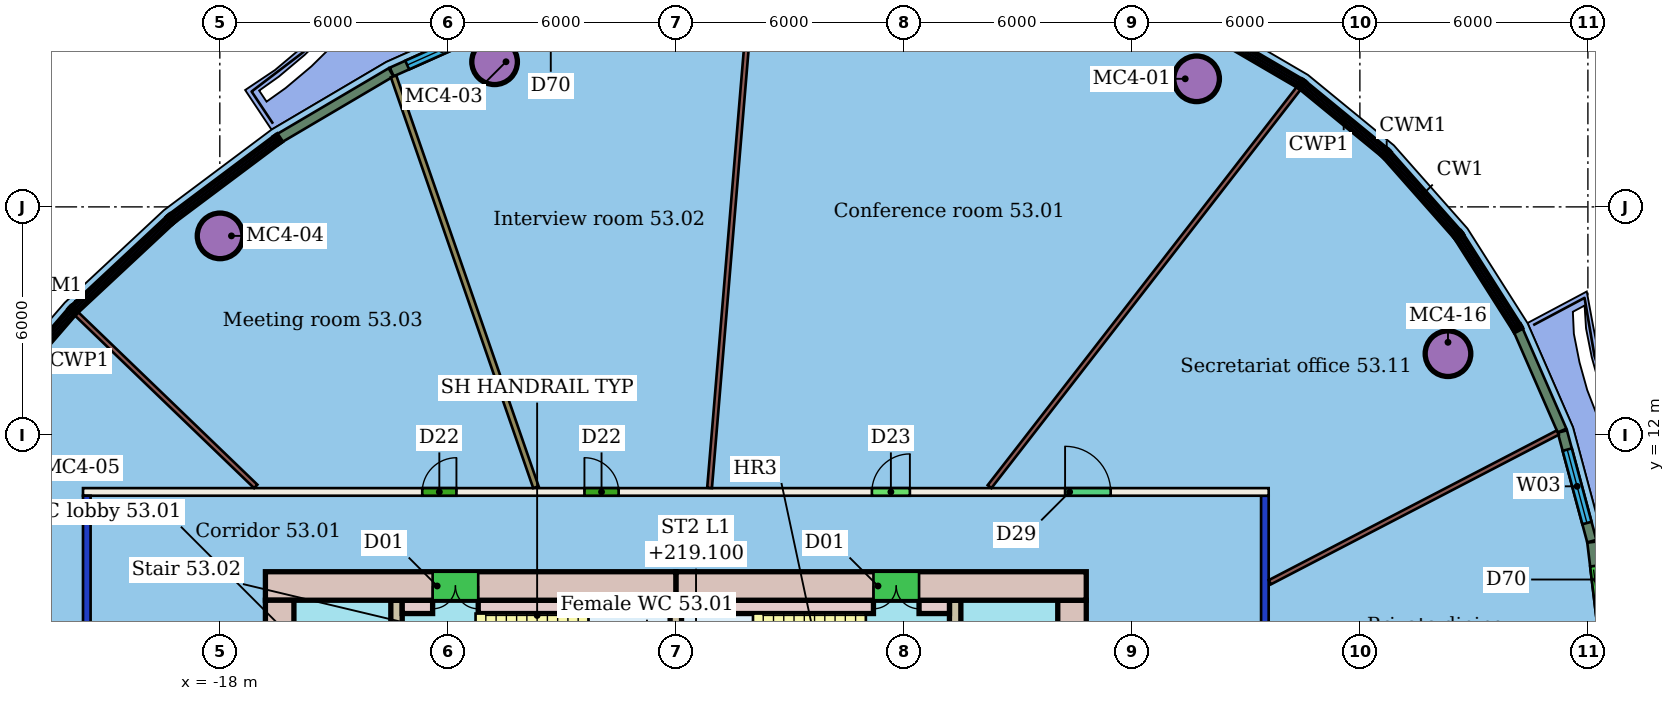
"""IFC4 building model, lengths in metres.
Left out: names, types, materials, properties, quantities, classifications, styles, units other than length and angle.
Written with IfcOpenShell. Run it as: python <this file> out.ifc"""

import sys

from ifc_helpers import new_model, si_unit, direction, frame, frame_2d, origin, origin_2d, place, context, subcontext, project, spatial, rectangle, hollow_circle, extrude, element, fill, save


model = new_model("IFC4")
c1 = context("Model", 3, precision=1e-05, world=origin(), true_north=direction((0.0, 1.0)))
c2 = subcontext(c1, "Body", "Model", "MODEL_VIEW")
j1 = project(units=[si_unit("LENGTHUNIT", "METRE"), si_unit("PLANEANGLEUNIT", "RADIAN")], contexts=[c1])
p1 = place(None, origin())
s1 = spatial("IfcSite", under=j1, at=p1, CompositionType="ELEMENT")
p2 = place(p1, origin())
s2 = spatial("IfcBuilding", under=s1, at=p2, CompositionType="ELEMENT")
p3 = place(p2, frame((0.0, 0.0, 217.3)))
s3 = spatial("IfcBuildingStorey", under=s2, at=p3, CompositionType="ELEMENT", Elevation=217.3)
for number, where, z_axis, x_axis in (
    (1, (7.704, 21.37, 0.0), (0.0, 0.0, 1.0), (1.0, 0.0, 0.0)),
    (2, (-10.769, 21.819, 0.0), (0.0, 0.0, 1.0), (1.0, 0.0, 0.0)),
    (3, (-17.993, 17.237, 0.0), (0.0, 0.0, 1.0), (1.0, 0.0, 0.0)),
    (4, (14.318, 14.137, 0.0), (0.0, 0.0, 1.0), (1.0, 0.0, 0.0)),
):
    element("IfcColumn", number, at=place(p3, frame(where, z_axis=z_axis, x_axis=x_axis)), inside=s3, PredefinedType="COLUMN", context=c2, shape_type="SweptSolid", body=[
        extrude(hollow_circle(Radius=0.6, WallThickness=0.045, at=origin_2d()), origin(), (0.0, 0.0, 1.0), 3.45),
    ])
p4 = place(p3, frame((-21.5, -10.4, 0.0), z_axis=(0.0, 0.0, 1.0), x_axis=(0.0, 1.0, 0.0)))
e5 = element("IfcWall", 5, at=p4, inside=s3, PredefinedType="PARTITIONING", context=c2, shape_type="SweptSolid", body=[
    extrude(rectangle(XDim=20.8, YDim=0.2, at=frame_2d((10.4, 0.0))), origin(), (0.0, 0.0, 1.0), 3.05),
])
p5 = place(p4, frame((13.596, 0.0, 0.0)))
e6 = element("IfcOpeningElement", 6, at=p5, cuts=e5, PredefinedType="OPENING", context=c2, shape_type="SweptSolid", body=[
    extrude(rectangle(XDim=1.0, YDim=2.4, at=frame_2d((0.5, 1.2))), frame((0.0, 0.11, 0.0), z_axis=(0.0, -1.0, 0.0), x_axis=(1.0, 0.0, 0.0)), (0.0, 0.0, 1.0), 0.22),
])
p6 = place(p4, frame((5.876, 0.0, 0.0)))
e7 = element("IfcOpeningElement", 7, at=p6, cuts=e5, PredefinedType="OPENING", context=c2, shape_type="SweptSolid", body=[
    extrude(rectangle(XDim=1.8, YDim=2.4, at=frame_2d((0.9, 1.2))), frame((0.0, 0.11, 0.0), z_axis=(0.0, -1.0, 0.0), x_axis=(1.0, 0.0, 0.0)), (0.0, 0.0, 1.0), 0.22),
])
p7 = place(p3, frame((-21.6, 10.5, 0.0), z_axis=(0.0, 0.0, 1.0), x_axis=(1.0, 0.0, 0.0)))
e8 = element("IfcWall", 8, at=p7, inside=s3, PredefinedType="PARTITIONING", context=c2, shape_type="SweptSolid", body=[
    extrude(rectangle(XDim=31.2, YDim=0.2, at=frame_2d((15.6, 0.0))), origin(), (0.0, 0.0, 1.0), 3.45),
])
p8 = place(p7, frame((20.759, 0.0, 0.0)))
e9 = element("IfcOpeningElement", 9, at=p8, cuts=e8, PredefinedType="OPENING", context=c2, shape_type="SweptSolid", body=[
    extrude(rectangle(XDim=1.0, YDim=2.4, at=frame_2d((0.5, 1.2))), frame((0.0, 0.11, 0.0), z_axis=(0.0, -1.0, 0.0), x_axis=(1.0, 0.0, 0.0)), (0.0, 0.0, 1.0), 0.22),
])
p9 = place(p7, frame((13.195, 0.0, 0.0)))
e10 = element("IfcOpeningElement", 10, at=p9, cuts=e8, PredefinedType="OPENING", context=c2, shape_type="SweptSolid", body=[
    extrude(rectangle(XDim=0.9, YDim=2.1, at=frame_2d((0.45, 1.05))), frame((0.0, 0.11, 0.0), z_axis=(0.0, -1.0, 0.0), x_axis=(1.0, 0.0, 0.0)), (0.0, 0.0, 1.0), 0.22),
])
p10 = place(p7, frame((8.927, 0.0, 0.0)))
e11 = element("IfcOpeningElement", 11, at=p10, cuts=e8, PredefinedType="OPENING", context=c2, shape_type="SweptSolid", body=[
    extrude(rectangle(XDim=0.9, YDim=2.1, at=frame_2d((0.45, 1.05))), frame((0.0, 0.11, 0.0), z_axis=(0.0, -1.0, 0.0), x_axis=(1.0, 0.0, 0.0)), (0.0, 0.0, 1.0), 0.22),
])
p11 = place(p7, frame((25.843, 0.0, 0.0)))
e12 = element("IfcOpeningElement", 12, at=p11, cuts=e8, PredefinedType="OPENING", context=c2, shape_type="SweptSolid", body=[
    extrude(rectangle(XDim=1.2, YDim=2.4, at=frame_2d((0.6, 1.2))), frame((0.0, 0.11, 0.0), z_axis=(0.0, -1.0, 0.0), x_axis=(1.0, 0.0, 0.0)), (0.0, 0.0, 1.0), 0.22),
])
p12 = place(p3, frame((9.5, 10.4, 0.0), z_axis=(0.0, 0.0, 1.0), x_axis=(0.0, -1.0, 0.0)))
e13 = element("IfcWall", 13, at=p12, inside=s3, PredefinedType="PARTITIONING", context=c2, shape_type="SweptSolid", body=[
    extrude(rectangle(XDim=20.8, YDim=0.2, at=frame_2d((10.4, 0.0))), origin(), (0.0, 0.0, 1.0), 3.05),
])
p13 = place(p12, frame((14.911, 0.0, 0.0)))
e14 = element("IfcOpeningElement", 14, at=p13, cuts=e13, PredefinedType="OPENING", context=c2, shape_type="SweptSolid", body=[
    extrude(rectangle(XDim=0.9, YDim=2.1, at=frame_2d((0.45, 1.05))), frame((0.0, 0.11, 0.0), z_axis=(0.0, -1.0, 0.0), x_axis=(1.0, 0.0, 0.0)), (0.0, 0.0, 1.0), 0.22),
])
p14 = place(p12, frame((4.489, 0.0, 0.0)))
e15 = element("IfcOpeningElement", 15, at=p14, cuts=e13, PredefinedType="OPENING", context=c2, shape_type="SweptSolid", body=[
    extrude(rectangle(XDim=1.5, YDim=2.1, at=frame_2d((0.75, 1.05))), frame((0.0, 0.11, 0.0), z_axis=(0.0, -1.0, 0.0), x_axis=(1.0, 0.0, 0.0)), (0.0, 0.0, 1.0), 0.22),
])
p15 = place(p3, frame((10.391, 21.124, 0.0), z_axis=(0.0, 0.0, 1.0), x_axis=(-0.613043629226, -0.790049054594, 0.0)))
e16 = element("IfcWall", 16, at=p15, inside=s3, PredefinedType="PARTITIONING", context=c2, shape_type="SweptSolid", body=[
    extrude(rectangle(XDim=13.271, YDim=0.125, at=frame_2d((6.636, 0.0))), origin(), (0.0, 0.0, 1.0), 3.45),
])
p16 = place(p3, frame((-3.958, 24.399, 0.0), z_axis=(0.0, 0.0, 1.0), x_axis=(-0.083375368872, -0.996518212511, 0.0)))
e17 = element("IfcWall", 17, at=p16, inside=s3, PredefinedType="PARTITIONING", context=c2, shape_type="SweptSolid", body=[
    extrude(rectangle(XDim=13.842, YDim=0.125, at=frame_2d((6.921, 0.0))), origin(), (0.0, 0.0, 1.0), 3.45),
])
p17 = place(p3, frame((-13.428, 21.434, 0.0), z_axis=(0.0, 0.0, 1.0), x_axis=(0.327447705094, -0.944869303358, 0.0)))
e18 = element("IfcWall", 18, at=p17, inside=s3, PredefinedType="PARTITIONING", context=c2, shape_type="SweptSolid", body=[
    extrude(rectangle(XDim=11.44, YDim=0.15, at=frame_2d((5.72, 0.0))), origin(), (0.0, 0.0, 1.0), 3.45),
])
p18 = place(p3, frame((-21.771, 15.187, 0.0), z_axis=(0.0, 0.0, 1.0), x_axis=(0.72030986436, -0.69365243408, 0.0)))
e19 = element("IfcWall", 19, at=p18, inside=s3, PredefinedType="PARTITIONING", context=c2, shape_type="SweptSolid", body=[
    extrude(rectangle(XDim=6.548, YDim=0.125, at=frame_2d((3.274, 0.0))), origin(), (0.0, 0.0, 1.0), 3.45),
])
p19 = place(p3, frame((17.207, 12.061, 0.0), z_axis=(0.0, 0.0, 1.0), x_axis=(-0.887319286248, -0.461155596574, 0.0)))
e20 = element("IfcWall", 20, at=p19, inside=s3, PredefinedType="PARTITIONING", context=c2, shape_type="SweptSolid", body=[
    extrude(rectangle(XDim=8.54, YDim=0.125, at=frame_2d((4.27, 0.0))), origin(), (0.0, 0.0, 1.0), 3.45),
])
p20 = place(p3, frame((-10.38, 22.933, 0.0), z_axis=(0.0, 0.0, 1.0), x_axis=(-0.913013847156, -0.40792856593, 0.0)))
e21 = element("IfcWall", 21, at=p20, inside=s3, PredefinedType="SOLIDWALL", context=c2, shape_type="SweptSolid", body=[
    extrude(rectangle(XDim=3.39, YDim=0.25, at=frame_2d((1.695, 0.0))), origin(), (0.0, 0.0, 1.0), 3.1),
])
p21 = place(p20, frame((0.945, 0.0, 0.9)))
e22 = element("IfcOpeningElement", 22, at=p21, cuts=e21, PredefinedType="OPENING", context=c2, shape_type="SweptSolid", body=[
    extrude(rectangle(XDim=2.0, YDim=2.1, at=frame_2d((1.0, 1.05))), frame((0.0, 0.135, 0.0), z_axis=(0.0, -1.0, 0.0), x_axis=(1.0, 0.0, 0.0)), (0.0, 0.0, 1.0), 0.27),
])
p22 = place(p3, frame((-13.495, 21.54, 0.0), z_axis=(0.0, 0.0, 1.0), x_axis=(-0.861311961965, -0.508076474731, 0.0)))
e23 = element("IfcWall", 23, at=p22, inside=s3, PredefinedType="SOLIDWALL", context=c2, shape_type="SweptSolid", body=[
    extrude(rectangle(XDim=3.403, YDim=0.25, at=frame_2d((1.701, 0.0))), origin(), (0.0, 0.0, 1.0), 3.1),
])
p23 = place(p3, frame((18.475, 6.137, 0.0), z_axis=(0.0, 0.0, 1.0), x_axis=(-0.119946033094, 0.992780413357, 0.0)))
e24 = element("IfcWall", 24, at=p23, inside=s3, PredefinedType="SOLIDWALL", context=c2, shape_type="SweptSolid", body=[
    extrude(rectangle(XDim=3.065, YDim=0.25, at=frame_2d((1.533, 0.0))), origin(), (0.0, 0.0, 1.0), 3.1),
])
p24 = place(p23, frame((0.633, 0.0, 0.0)))
e25 = element("IfcOpeningElement", 25, at=p24, cuts=e24, PredefinedType="OPENING", context=c2, shape_type="SweptSolid", body=[
    extrude(rectangle(XDim=1.8, YDim=2.4, at=frame_2d((0.9, 1.2))), frame((0.0, 0.135, 0.0), z_axis=(0.0, -1.0, 0.0), x_axis=(1.0, 0.0, 0.0)), (0.0, 0.0, 1.0), 0.27),
])
p25 = place(p3, frame((18.103, 9.206, 0.0), z_axis=(0.0, 0.0, 1.0), x_axis=(-0.25942805707, 0.965762436215, 0.0)))
e26 = element("IfcWall", 26, at=p25, inside=s3, PredefinedType="SOLIDWALL", context=c2, shape_type="SweptSolid", body=[
    extrude(rectangle(XDim=2.986, YDim=0.25, at=frame_2d((1.493, 0.0))), origin(), (0.0, 0.0, 1.0), 3.1),
])
p26 = place(p25, frame((0.493, 0.0, 0.9)))
e27 = element("IfcOpeningElement", 27, at=p26, cuts=e26, PredefinedType="OPENING", context=c2, shape_type="SweptSolid", body=[
    extrude(rectangle(XDim=2.0, YDim=2.1, at=frame_2d((1.0, 1.05))), frame((0.0, 0.135, 0.0), z_axis=(0.0, -1.0, 0.0), x_axis=(1.0, 0.0, 0.0)), (0.0, 0.0, 1.0), 0.27),
])
p27 = place(p3, frame((17.319, 12.115, 0.0), z_axis=(0.0, 0.0, 1.0), x_axis=(-0.40003123877, 0.91650150464, 0.0)))
e28 = element("IfcWall", 28, at=p27, inside=s3, PredefinedType="SOLIDWALL", context=c2, shape_type="SweptSolid", body=[
    extrude(rectangle(XDim=2.879, YDim=0.25, at=frame_2d((1.439, 0.0))), origin(), (0.0, 0.0, 1.0), 3.1),
])
p28 = place(p3, frame((4.8, 8.025, 0.0), z_axis=(0.0, 0.0, 1.0), x_axis=(-1.0, 0.0, 0.0)))
e29 = element("IfcWall", 29, at=p28, inside=s3, PredefinedType="SHEAR", context=c2, shape_type="SweptSolid", body=[
    extrude(rectangle(XDim=10.8, YDim=0.75, at=frame_2d((5.4, 0.0))), origin(), (0.0, 0.0, 1.0), 3.3),
])
p29 = place(p28, frame((4.4, 0.0, 0.0)))
e30 = element("IfcOpeningElement", 30, at=p29, cuts=e29, PredefinedType="OPENING", context=c2, shape_type="SweptSolid", body=[
    extrude(rectangle(XDim=1.2, YDim=2.1, at=frame_2d((0.6, 1.05))), frame((0.0, 0.385, 0.0), z_axis=(0.0, -1.0, 0.0), x_axis=(1.0, 0.0, 0.0)), (0.0, 0.0, 1.0), 0.77),
])
p30 = place(p3, frame((-6.0, 8.025, 0.0), z_axis=(0.0, 0.0, 1.0), x_axis=(-1.0, 0.0, 0.0)))
e31 = element("IfcWall", 31, at=p30, inside=s3, PredefinedType="SHEAR", context=c2, shape_type="SweptSolid", body=[
    extrude(rectangle(XDim=10.8, YDim=0.75, at=frame_2d((5.4, 0.0))), origin(), (0.0, 0.0, 1.0), 3.3),
])
p31 = place(p30, frame((5.2, 0.0, 0.0)))
e32 = element("IfcOpeningElement", 32, at=p31, cuts=e31, PredefinedType="OPENING", context=c2, shape_type="SweptSolid", body=[
    extrude(rectangle(XDim=1.2, YDim=2.1, at=frame_2d((0.6, 1.05))), frame((0.0, 0.385, 0.0), z_axis=(0.0, -1.0, 0.0), x_axis=(1.0, 0.0, 0.0)), (0.0, 0.0, 1.0), 0.77),
])
p32 = place(p3, frame((-16.425, 7.65, 0.0), z_axis=(0.0, 0.0, 1.0), x_axis=(0.0, -1.0, 0.0)))
e33 = element("IfcWall", 33, at=p32, inside=s3, PredefinedType="SHEAR", context=c2, shape_type="SweptSolid", body=[
    extrude(rectangle(XDim=15.3, YDim=0.75, at=frame_2d((7.65, 0.0))), origin(), (0.0, 0.0, 1.0), 3.3),
])
p33 = place(p32, frame((11.25, 0.0, 0.0)))
e34 = element("IfcOpeningElement", 34, at=p33, cuts=e33, PredefinedType="OPENING", context=c2, shape_type="SweptSolid", body=[
    extrude(rectangle(XDim=1.2, YDim=2.1, at=frame_2d((0.6, 1.05))), frame((0.0, 0.385, 0.0), z_axis=(0.0, -1.0, 0.0), x_axis=(1.0, 0.0, 0.0)), (0.0, 0.0, 1.0), 0.77),
])
p34 = place(p32, frame((2.85, 0.0, 0.0)))
e35 = element("IfcOpeningElement", 35, at=p34, cuts=e33, PredefinedType="OPENING", context=c2, shape_type="SweptSolid", body=[
    extrude(rectangle(XDim=1.2, YDim=2.1, at=frame_2d((0.6, 1.05))), frame((0.0, 0.385, 0.0), z_axis=(0.0, -1.0, 0.0), x_axis=(1.0, 0.0, 0.0)), (0.0, 0.0, 1.0), 0.77),
])
p35 = place(p3, frame((4.425, -7.65, 0.0), z_axis=(0.0, 0.0, 1.0), x_axis=(0.0, 1.0, 0.0)))
e36 = element("IfcWall", 36, at=p35, inside=s3, PredefinedType="SHEAR", context=c2, shape_type="SweptSolid", body=[
    extrude(rectangle(XDim=15.3, YDim=0.75, at=frame_2d((7.65, 0.0))), origin(), (0.0, 0.0, 1.0), 3.3),
])
p36 = place(p35, frame((2.85, 0.0, 0.0)))
e37 = element("IfcOpeningElement", 37, at=p36, cuts=e36, PredefinedType="OPENING", context=c2, shape_type="SweptSolid", body=[
    extrude(rectangle(XDim=1.2, YDim=2.1, at=frame_2d((0.6, 1.05))), frame((0.0, 0.385, 0.0), z_axis=(0.0, -1.0, 0.0), x_axis=(1.0, 0.0, 0.0)), (0.0, 0.0, 1.0), 0.77),
])
p37 = place(p35, frame((11.25, 0.0, 0.0)))
e38 = element("IfcOpeningElement", 38, at=p37, cuts=e36, PredefinedType="OPENING", context=c2, shape_type="SweptSolid", body=[
    extrude(rectangle(XDim=1.2, YDim=2.1, at=frame_2d((0.6, 1.05))), frame((0.0, 0.385, 0.0), z_axis=(0.0, -1.0, 0.0), x_axis=(1.0, 0.0, 0.0)), (0.0, 0.0, 1.0), 0.77),
])
p38 = place(p3, frame((-13.35, 7.65, 0.0), z_axis=(0.0, 0.0, 1.0), x_axis=(0.0, -1.0, 0.0)))
e39 = element("IfcWall", 39, at=p38, inside=s3, PredefinedType="SHEAR", context=c2, shape_type="SweptSolid", body=[
    extrude(rectangle(XDim=15.3, YDim=0.3, at=frame_2d((7.65, 0.0))), origin(), (0.0, 0.0, 1.0), 3.3),
])
p39 = place(p38, frame((6.9, 0.0, 0.0)))
e40 = element("IfcOpeningElement", 40, at=p39, cuts=e39, PredefinedType="OPENING", context=c2, shape_type="SweptSolid", body=[
    extrude(rectangle(XDim=1.5, YDim=2.1, at=frame_2d((0.75, 1.05))), frame((0.0, 0.16, 0.0), z_axis=(0.0, -1.0, 0.0), x_axis=(1.0, 0.0, 0.0)), (0.0, 0.0, 1.0), 0.32),
])
p40 = place(p3, frame((1.35, -7.65, 0.0), z_axis=(0.0, 0.0, 1.0), x_axis=(0.0, 1.0, 0.0)))
e41 = element("IfcWall", 41, at=p40, inside=s3, PredefinedType="SHEAR", context=c2, shape_type="SweptSolid", body=[
    extrude(rectangle(XDim=15.3, YDim=0.3, at=frame_2d((7.65, 0.0))), origin(), (0.0, 0.0, 1.0), 3.3),
])
p41 = place(p40, frame((1.56, 0.0, 0.0)))
e42 = element("IfcOpeningElement", 42, at=p41, cuts=e41, PredefinedType="OPENING", context=c2, shape_type="SweptSolid", body=[
    extrude(rectangle(XDim=1.0, YDim=2.1, at=frame_2d((0.5, 1.05))), frame((0.0, 0.16, 0.0), z_axis=(0.0, -1.0, 0.0), x_axis=(1.0, 0.0, 0.0)), (0.0, 0.0, 1.0), 0.32),
])
p42 = place(p40, frame((6.9, 0.0, 0.0)))
e43 = element("IfcOpeningElement", 43, at=p42, cuts=e41, PredefinedType="OPENING", context=c2, shape_type="SweptSolid", body=[
    extrude(rectangle(XDim=1.5, YDim=2.1, at=frame_2d((0.75, 1.05))), frame((0.0, 0.16, 0.0), z_axis=(0.0, -1.0, 0.0), x_axis=(1.0, 0.0, 0.0)), (0.0, 0.0, 1.0), 0.32),
])
p43 = place(p3, frame((-6.0, 3.88, 0.0), z_axis=(0.0, 0.0, 1.0), x_axis=(0.0, 1.0, 0.0)))
e44 = element("IfcWall", 44, at=p43, inside=s3, PredefinedType="SHEAR", context=c2, shape_type="SweptSolid", body=[
    extrude(rectangle(XDim=3.77, YDim=0.3, at=frame_2d((1.885, 0.0))), origin(), (0.0, 0.0, 1.0), 3.3),
])
p44 = place(p3, frame((-13.2, 7.475, 0.0), z_axis=(0.0, 0.0, 1.0), x_axis=(1.0, 0.0, 0.0)))
e45 = element("IfcWall", 45, at=p44, inside=s3, PredefinedType="SHEAR", context=c2, shape_type="SweptSolid", body=[
    extrude(rectangle(XDim=0.8, YDim=0.35, at=frame_2d((0.4, 0.0))), origin(), (0.0, 0.0, 1.0), 3.3),
])
for number, where, z_axis, x_axis in (
    (46, (-11.2, 7.475, 0.0), (0.0, 0.0, 1.0), (1.0, 0.0, 0.0)),
    (47, (-5.85, 7.475, 0.0), (0.0, 0.0, 1.0), (1.0, 0.0, 0.0)),
):
    element("IfcWall", number, at=place(p3, frame(where, z_axis=z_axis, x_axis=x_axis)), inside=s3, PredefinedType="SHEAR", context=c2, shape_type="SweptSolid", body=[
        extrude(rectangle(XDim=5.05, YDim=0.35, at=frame_2d((2.525, 0.0))), origin(), (0.0, 0.0, 1.0), 3.3),
    ])
p45 = place(p3, frame((0.4, 7.475, 0.0), z_axis=(0.0, 0.0, 1.0), x_axis=(1.0, 0.0, 0.0)))
e48 = element("IfcWall", 48, at=p45, inside=s3, PredefinedType="SHEAR", context=c2, shape_type="SweptSolid", body=[
    extrude(rectangle(XDim=0.8, YDim=0.35, at=frame_2d((0.4, 0.0))), origin(), (0.0, 0.0, 1.0), 3.3),
])
p46 = place(p8, origin())
e49 = element("IfcDoor", 49, at=p46, inside=s3, OperationType="SINGLE_SWING_RIGHT", PredefinedType="DOOR", context=c2, shape_type="SweptSolid", body=[
    extrude(rectangle(XDim=1.0, YDim=2.4, at=frame_2d((0.5, 1.2))), frame((0.0, 0.025, 0.0), z_axis=(0.0, -1.0, 0.0), x_axis=(1.0, 0.0, 0.0)), (0.0, 0.0, 1.0), 0.05),
])
fill(e9, e49)
p47 = place(p9, origin())
e50 = element("IfcDoor", 50, at=p47, inside=s3, OperationType="SINGLE_SWING_LEFT", PredefinedType="DOOR", context=c2, shape_type="SweptSolid", body=[
    extrude(rectangle(XDim=0.9, YDim=2.1, at=frame_2d((0.45, 1.05))), frame((0.0, 0.025, 0.0), z_axis=(0.0, -1.0, 0.0), x_axis=(1.0, 0.0, 0.0)), (0.0, 0.0, 1.0), 0.05),
])
fill(e10, e50)
p48 = place(p10, origin())
e51 = element("IfcDoor", 51, at=p48, inside=s3, OperationType="SINGLE_SWING_RIGHT", PredefinedType="DOOR", context=c2, shape_type="SweptSolid", body=[
    extrude(rectangle(XDim=0.9, YDim=2.1, at=frame_2d((0.45, 1.05))), frame((0.0, 0.025, 0.0), z_axis=(0.0, -1.0, 0.0), x_axis=(1.0, 0.0, 0.0)), (0.0, 0.0, 1.0), 0.05),
])
fill(e11, e51)
p49 = place(p11, origin())
e52 = element("IfcDoor", 52, at=p49, inside=s3, OperationType="SINGLE_SWING_LEFT", PredefinedType="DOOR", context=c2, shape_type="SweptSolid", body=[
    extrude(rectangle(XDim=1.2, YDim=2.4, at=frame_2d((0.6, 1.2))), frame((0.0, 0.025, 0.0), z_axis=(0.0, -1.0, 0.0), x_axis=(1.0, 0.0, 0.0)), (0.0, 0.0, 1.0), 0.05),
])
fill(e12, e52)
p50 = place(p21, origin())
e53 = element("IfcWindow", 53, at=p50, inside=s3, PartitioningType="SINGLE_PANEL", PredefinedType="WINDOW", context=c2, shape_type="SweptSolid", body=[
    extrude(rectangle(XDim=2.0, YDim=2.1, at=frame_2d((1.0, 1.05))), frame((0.0, 0.03, 0.0), z_axis=(0.0, -1.0, 0.0), x_axis=(1.0, 0.0, 0.0)), (0.0, 0.0, 1.0), 0.06),
])
fill(e22, e53)
p51 = place(p24, origin())
e54 = element("IfcDoor", 54, at=p51, inside=s3, OperationType="DOUBLE_DOOR_SLIDING", PredefinedType="DOOR", context=c2, shape_type="SweptSolid", body=[
    extrude(rectangle(XDim=1.8, YDim=2.4, at=frame_2d((0.9, 1.2))), frame((0.0, 0.025, 0.0), z_axis=(0.0, -1.0, 0.0), x_axis=(1.0, 0.0, 0.0)), (0.0, 0.0, 1.0), 0.05),
])
fill(e25, e54)
p52 = place(p26, origin())
e55 = element("IfcWindow", 55, at=p52, inside=s3, PartitioningType="SINGLE_PANEL", PredefinedType="WINDOW", context=c2, shape_type="SweptSolid", body=[
    extrude(rectangle(XDim=2.0, YDim=2.1, at=frame_2d((1.0, 1.05))), frame((0.0, 0.03, 0.0), z_axis=(0.0, -1.0, 0.0), x_axis=(1.0, 0.0, 0.0)), (0.0, 0.0, 1.0), 0.06),
])
fill(e27, e55)
p53 = place(p29, origin())
e56 = element("IfcDoor", 56, at=p53, inside=s3, OperationType="DOUBLE_DOOR_SINGLE_SWING", PredefinedType="NOTDEFINED", context=c2, shape_type="SweptSolid", body=[
    extrude(rectangle(XDim=1.2, YDim=2.1, at=frame_2d((0.6, 1.05))), frame((0.0, 0.025, 0.0), z_axis=(0.0, -1.0, 0.0), x_axis=(1.0, 0.0, 0.0)), (0.0, 0.0, 1.0), 0.05),
])
fill(e30, e56)
p54 = place(p31, origin())
e57 = element("IfcDoor", 57, at=p54, inside=s3, OperationType="DOUBLE_DOOR_SINGLE_SWING", PredefinedType="NOTDEFINED", context=c2, shape_type="SweptSolid", body=[
    extrude(rectangle(XDim=1.2, YDim=2.1, at=frame_2d((0.6, 1.05))), frame((0.0, 0.025, 0.0), z_axis=(0.0, -1.0, 0.0), x_axis=(1.0, 0.0, 0.0)), (0.0, 0.0, 1.0), 0.05),
])
fill(e32, e57)
save(model, sys.argv[1])
